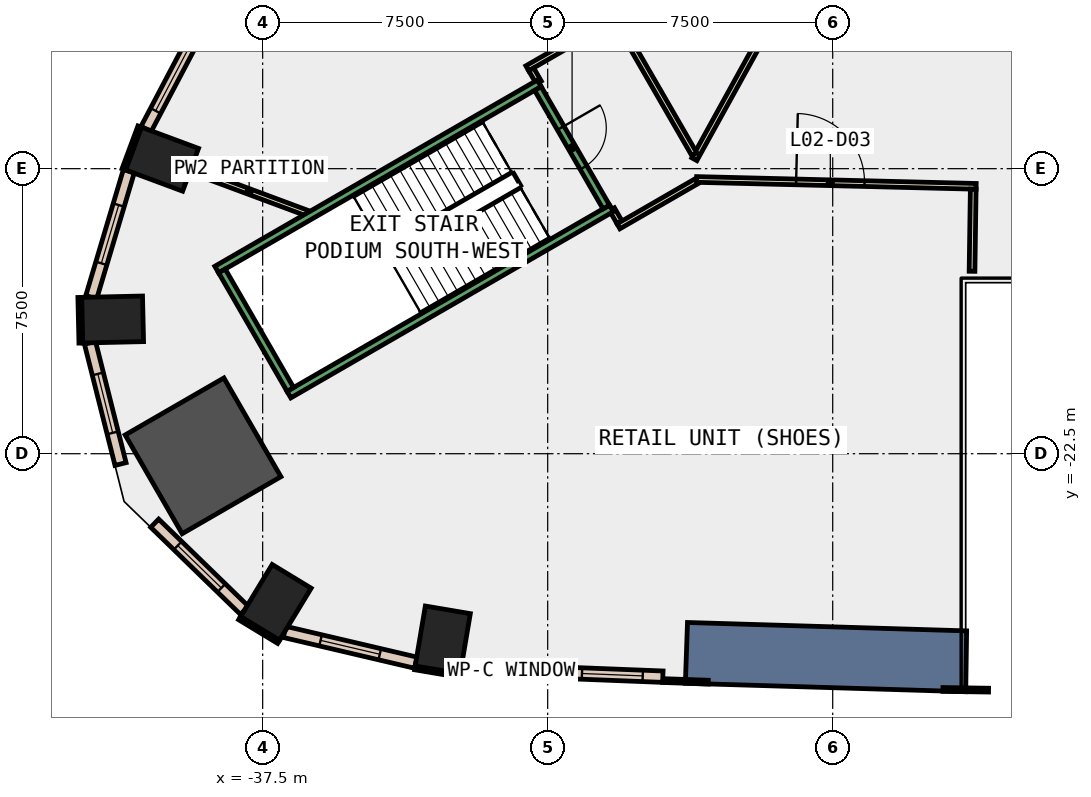
"""IFC4 building model, lengths in metres.
Left out: names, types, materials, properties, quantities, classifications, styles, units other than length and angle.
Written with IfcOpenShell. Run it as: python <this file> out.ifc"""

import sys

from ifc_helpers import new_model, si_unit, direction, frame, frame_2d, origin, origin_2d, place, context, subcontext, project, spatial, polyline, rectangle, outline, extrude, element, fill, save


model = new_model("IFC4")
c1 = context("Model", 3, precision=1e-05, world=origin(), true_north=direction((0.0, 1.0)))
c2 = subcontext(c1, "Body", "Model", "MODEL_VIEW")
j1 = project(units=[si_unit("LENGTHUNIT", "METRE"), si_unit("PLANEANGLEUNIT", "RADIAN")], contexts=[c1])
p1 = place(None, origin())
s1 = spatial("IfcSite", under=j1, at=p1, CompositionType="ELEMENT")
p2 = place(p1, origin())
s2 = spatial("IfcBuilding", under=s1, at=p2, CompositionType="ELEMENT")
p3 = place(p2, frame((0.0, 0.0, 15.0)))
s3 = spatial("IfcBuildingStorey", under=s2, at=p3, CompositionType="ELEMENT", Elevation=15.0)
for number, where, z_axis, x_axis in (
    (1, (-32.761, -27.397, -0.45), (0.0, 0.0, 1.0), (-0.986, 0.167, 0.0)),
    (2, (-40.147, -14.751, -0.45), (0.0, 0.0, 1.0), (0.348, 0.937, 0.0)),
    (3, (-41.448, -18.969, -0.45), (0.0, 0.0, 1.0), (-0.023, 1.0, 0.0)),
):
    element("IfcColumn", number, at=place(p3, frame(where, z_axis=z_axis, x_axis=x_axis)), inside=s3, PredefinedType="COLUMN", context=c2, shape_type="SweptSolid", body=[
        extrude(rectangle(XDim=1.2, YDim=1.6, at=origin_2d()), origin(), (0.0, 0.0, 1.0), 5.0),
    ])
p4 = place(p3, frame((-39.069, -22.556, -0.45), z_axis=(0.0, 0.0, 1.0), x_axis=(0.866025403784, 0.5, 0.0)))
e4 = element("IfcColumn", 4, at=p4, inside=s3, PredefinedType="COLUMN", context=c2, shape_type="SweptSolid", body=[
    extrude(rectangle(XDim=3.0, YDim=3.0, at=origin_2d()), origin(), (0.0, 0.0, 1.0), 5.0),
])
p5 = place(p3, frame((-37.152, -26.411, -0.45), z_axis=(0.0, 0.0, 1.0), x_axis=(-0.854522294989, 0.519414716163, 0.0)))
e5 = element("IfcColumn", 5, at=p5, inside=s3, PredefinedType="COLUMN", context=c2, shape_type="SweptSolid", body=[
    extrude(rectangle(XDim=1.2, YDim=1.6, at=origin_2d()), origin(), (0.0, 0.0, 1.0), 5.0),
])
p6 = place(p3, frame((0.0, 0.0, -0.45)))
e6 = element("IfcWall", 6, at=p6, inside=s3, PredefinedType="SHEAR", context=c2, shape_type="SweptSolid", body=[
    extrude(outline(polyline([(-26.377, -28.54), (-19.0, -28.762), (-18.976, -27.162), (-26.321, -26.941), (-26.377, -28.54)])), origin(), (0.0, 0.0, 1.0), 5.0),
])
p7 = place(p3, frame((-40.735, -13.893, 0.0), z_axis=(0.0, 0.0, 1.0), x_axis=(-0.348268249601, -0.937394914814, 0.0)))
e7 = element("IfcWall", 7, at=p7, inside=s3, PredefinedType="STANDARD", context=c2, shape_type="SweptSolid", body=[
    extrude(rectangle(XDim=1.2, YDim=0.1, at=frame_2d((0.6, 0.0))), origin(), (0.0, 0.0, 1.0), 4.55),
])
p8 = place(p3, frame((-33.494, -28.135, 0.0), z_axis=(0.0, 0.0, 1.0), x_axis=(0.986011774526, -0.166675674579, 0.0)))
e8 = element("IfcWall", 8, at=p8, inside=s3, PredefinedType="STANDARD", context=c2, shape_type="SweptSolid", body=[
    extrude(rectangle(XDim=1.2, YDim=0.1, at=frame_2d((0.6, 0.0))), origin(), (0.0, 0.0, 1.0), 4.55),
])
p9 = place(p3, frame((-26.975, -28.469, 0.0), z_axis=(0.0, 0.0, 1.0), x_axis=(0.999387493042, -0.034994838926, 0.0)))
e9 = element("IfcWall", 9, at=p9, inside=s3, PredefinedType="STANDARD", context=c2, shape_type="SweptSolid", body=[
    extrude(rectangle(XDim=1.2, YDim=0.1, at=frame_2d((0.6, 0.0))), origin(), (0.0, 0.0, 1.0), 4.55),
])
p10 = place(p3, frame((-19.599, -28.703, 0.0), z_axis=(0.0, 0.0, 1.0), x_axis=(0.999886724523, -0.015051183404, 0.0)))
e10 = element("IfcWall", 10, at=p10, inside=s3, PredefinedType="STANDARD", context=c2, shape_type="SweptSolid", body=[
    extrude(rectangle(XDim=1.2, YDim=0.1, at=frame_2d((0.6, 0.0))), origin(), (0.0, 0.0, 1.0), 4.55),
])
for number, where, z_axis, x_axis in (
    (11, (-42.312, -18.388, 0.0), (0.0, 0.0, 1.0), (0.023, -1.0, 0.0)),
    (12, (-38.106, -26.826, 0.0), (0.0, 0.0, 1.0), (0.855, -0.519, 0.0)),
):
    element("IfcWall", number, at=place(p3, frame(where, z_axis=z_axis, x_axis=x_axis)), inside=s3, PredefinedType="STANDARD", context=c2, shape_type="SweptSolid", body=[
        extrude(rectangle(XDim=1.2, YDim=0.1, at=frame_2d((0.6, 0.0))), origin(), (0.0, 0.0, 1.0), 4.55),
    ])
p11 = place(p3, frame((-32.282, -28.159, 0.0), z_axis=(0.0, 0.0, 1.0), x_axis=(0.999234205654, -0.039128023863, 0.0)))
e13 = element("IfcWall", 13, at=p11, inside=s3, PredefinedType="STANDARD", context=c2, shape_type="SweptSolid", body=[
    extrude(rectangle(XDim=5.316, YDim=0.3, at=frame_2d((2.658, 0.0))), origin(), (0.0, 0.0, 1.0), 4.55),
])
p12 = place(p11, frame((0.529, 0.0, 1.0)))
e14 = element("IfcOpeningElement", 14, at=p12, cuts=e13, PredefinedType="OPENING", context=c2, shape_type="SweptSolid", body=[
    extrude(rectangle(XDim=1.6, YDim=3.2, at=frame_2d((0.8, 1.6))), frame((0.0, 0.16, 0.0), z_axis=(0.0, -1.0, 0.0), x_axis=(1.0, 0.0, 0.0)), (0.0, 0.0, 1.0), 0.32),
])
p13 = place(p11, frame((3.187, 0.0, 1.0)))
e15 = element("IfcOpeningElement", 15, at=p13, cuts=e13, PredefinedType="OPENING", context=c2, shape_type="SweptSolid", body=[
    extrude(rectangle(XDim=1.6, YDim=3.2, at=frame_2d((0.8, 1.6))), frame((0.0, 0.16, 0.0), z_axis=(0.0, -1.0, 0.0), x_axis=(1.0, 0.0, 0.0)), (0.0, 0.0, 1.0), 0.32),
])
p14 = place(p3, frame((-37.695, -8.503, 0.0), z_axis=(0.0, 0.0, 1.0), x_axis=(-0.466125129602, -0.884718804792, 0.0)))
e16 = element("IfcWall", 16, at=p14, inside=s3, PredefinedType="STANDARD", context=c2, shape_type="SweptSolid", body=[
    extrude(rectangle(XDim=6.164, YDim=0.3, at=frame_2d((3.082, 0.0))), origin(), (0.0, 0.0, 1.0), 4.55),
])
p15 = place(p14, frame((0.541, 0.0, 1.0)))
e17 = element("IfcOpeningElement", 17, at=p15, cuts=e16, PredefinedType="OPENING", context=c2, shape_type="SweptSolid", body=[
    extrude(rectangle(XDim=2.0, YDim=3.2, at=frame_2d((1.0, 1.6))), frame((0.0, 0.16, 0.0), z_axis=(0.0, -1.0, 0.0), x_axis=(1.0, 0.0, 0.0)), (0.0, 0.0, 1.0), 0.32),
])
p16 = place(p14, frame((3.623, 0.0, 1.0)))
e18 = element("IfcOpeningElement", 18, at=p16, cuts=e16, PredefinedType="OPENING", context=c2, shape_type="SweptSolid", body=[
    extrude(rectangle(XDim=2.0, YDim=3.2, at=frame_2d((1.0, 1.6))), frame((0.0, 0.16, 0.0), z_axis=(0.0, -1.0, 0.0), x_axis=(1.0, 0.0, 0.0)), (0.0, 0.0, 1.0), 0.32),
])
p17 = place(p3, frame((-41.022, -15.066, 0.0), z_axis=(0.0, 0.0, 1.0), x_axis=(-0.285800575124, -0.958289116738, 0.0)))
e19 = element("IfcWall", 19, at=p17, inside=s3, PredefinedType="STANDARD", context=c2, shape_type="SweptSolid", body=[
    extrude(rectangle(XDim=3.46, YDim=0.3, at=frame_2d((1.73, 0.0))), origin(), (0.0, 0.0, 1.0), 4.55),
])
p18 = place(p17, frame((0.93, 0.0, 1.0)))
e20 = element("IfcOpeningElement", 20, at=p18, cuts=e19, PredefinedType="OPENING", context=c2, shape_type="SweptSolid", body=[
    extrude(rectangle(XDim=1.6, YDim=3.2, at=frame_2d((0.8, 1.6))), frame((0.0, 0.16, 0.0), z_axis=(0.0, -1.0, 0.0), x_axis=(1.0, 0.0, 0.0)), (0.0, 0.0, 1.0), 0.32),
])
p19 = place(p3, frame((-42.044, -19.581, 0.0), z_axis=(0.0, 0.0, 1.0), x_axis=(0.244315836028, -0.969695711172, 0.0)))
e21 = element("IfcWall", 21, at=p19, inside=s3, PredefinedType="STANDARD", context=c2, shape_type="SweptSolid", body=[
    extrude(rectangle(XDim=3.291, YDim=0.3, at=frame_2d((1.645, 0.0))), origin(), (0.0, 0.0, 1.0), 4.55),
])
p20 = place(p19, frame((0.845, 0.0, 1.0)))
e22 = element("IfcOpeningElement", 22, at=p20, cuts=e21, PredefinedType="OPENING", context=c2, shape_type="SweptSolid", body=[
    extrude(rectangle(XDim=1.6, YDim=3.2, at=frame_2d((0.8, 1.6))), frame((0.0, 0.16, 0.0), z_axis=(0.0, -1.0, 0.0), x_axis=(1.0, 0.0, 0.0)), (0.0, 0.0, 1.0), 0.32),
])
p21 = place(p3, frame((-40.341, -24.329, 0.0), z_axis=(0.0, 0.0, 1.0), x_axis=(0.717527250225, -0.696530433782, 0.0)))
e23 = element("IfcWall", 23, at=p21, inside=s3, PredefinedType="STANDARD", context=c2, shape_type="SweptSolid", body=[
    extrude(rectangle(XDim=3.291, YDim=0.3, at=frame_2d((1.645, 0.0))), origin(), (0.0, 0.0, 1.0), 4.55),
])
p22 = place(p21, frame((0.845, 0.0, 1.0)))
e24 = element("IfcOpeningElement", 24, at=p22, cuts=e23, PredefinedType="OPENING", context=c2, shape_type="SweptSolid", body=[
    extrude(rectangle(XDim=1.6, YDim=3.2, at=frame_2d((0.8, 1.6))), frame((0.0, 0.16, 0.0), z_axis=(0.0, -1.0, 0.0), x_axis=(1.0, 0.0, 0.0)), (0.0, 0.0, 1.0), 0.32),
])
p23 = place(p3, frame((-36.923, -27.189, 0.0), z_axis=(0.0, 0.0, 1.0), x_axis=(0.97357041301, -0.228387063799, 0.0)))
e25 = element("IfcWall", 25, at=p23, inside=s3, PredefinedType="STANDARD", context=c2, shape_type="SweptSolid", body=[
    extrude(rectangle(XDim=3.547, YDim=0.3, at=frame_2d((1.773, 0.0))), origin(), (0.0, 0.0, 1.0), 4.55),
])
p24 = place(p23, frame((0.973, 0.0, 1.0)))
e26 = element("IfcOpeningElement", 26, at=p24, cuts=e25, PredefinedType="OPENING", context=c2, shape_type="SweptSolid", body=[
    extrude(rectangle(XDim=1.6, YDim=3.2, at=frame_2d((0.8, 1.6))), frame((0.0, 0.16, 0.0), z_axis=(0.0, -1.0, 0.0), x_axis=(1.0, 0.0, 0.0)), (0.0, 0.0, 1.0), 0.32),
])
p25 = place(p3, frame((-39.378, -15.037, 0.0), z_axis=(0.0, 0.0, 1.0), x_axis=(0.937400028274, -0.348254485961, 0.0)))
e27 = element("IfcWall", 27, at=p25, inside=s3, PredefinedType="PARTITIONING", context=c2, shape_type="SweptSolid", body=[
    extrude(rectangle(XDim=3.247, YDim=0.15, at=frame_2d((1.624, 0.0))), origin(), (0.0, 0.0, 1.0), 4.55),
])
p26 = place(p3, frame((-28.309, -16.067, 0.0), z_axis=(0.0, 0.0, 1.0), x_axis=(0.499546646484, -0.86628698939, 0.0)))
e28 = element("IfcWall", 28, at=p26, inside=s3, PredefinedType="PARTITIONING", context=c2, shape_type="SweptSolid", body=[
    extrude(rectangle(XDim=0.401, YDim=0.15, at=frame_2d((0.2, 0.0))), origin(), (0.0, 0.0, 1.0), 4.55),
])
p27 = place(p3, frame((-28.137, -16.517, 0.0), z_axis=(0.0, 0.0, 1.0), x_axis=(0.865960610734, 0.500112208066, 0.0)))
e29 = element("IfcWall", 29, at=p27, inside=s3, PredefinedType="PARTITIONING", context=c2, shape_type="SweptSolid", body=[
    extrude(rectangle(XDim=2.386, YDim=0.15, at=frame_2d((1.193, 0.0))), origin(), (0.0, 0.0, 1.0), 4.55),
])
p28 = place(p3, frame((-26.081, -15.284, 0.0), z_axis=(0.0, 0.0, 1.0), x_axis=(0.999696822244, -0.02462242057, 0.0)))
e30 = element("IfcWall", 30, at=p28, inside=s3, PredefinedType="PARTITIONING", context=c2, shape_type="SweptSolid", body=[
    extrude(rectangle(XDim=7.357, YDim=0.15, at=frame_2d((3.679, 0.0))), origin(), (0.0, 0.0, 1.0), 4.55),
])
p29 = place(p28, frame((2.619, 0.0, 0.0)))
e31 = element("IfcOpeningElement", 31, at=p29, cuts=e30, PredefinedType="OPENING", context=c2, shape_type="SweptSolid", body=[
    extrude(rectangle(XDim=1.8, YDim=2.1, at=frame_2d((0.9, 1.05))), frame((0.0, 0.085, 0.0), z_axis=(0.0, -1.0, 0.0), x_axis=(1.0, 0.0, 0.0)), (0.0, 0.0, 1.0), 0.17),
])
p30 = place(p3, frame((-18.802, -15.538, 0.0), z_axis=(0.0, 0.0, 1.0), x_axis=(-0.014792283123, -0.999890588195, 0.0)))
e32 = element("IfcWall", 32, at=p30, inside=s3, PredefinedType="PARTITIONING", context=c2, shape_type="SweptSolid", body=[
    extrude(rectangle(XDim=2.162, YDim=0.15, at=frame_2d((1.081, 0.0))), origin(), (0.0, 0.0, 1.0), 4.55),
])
p31 = place(p3, frame((-22.654, -8.434, 0.0), z_axis=(0.0, 0.0, 1.0), x_axis=(-0.483089865042, -0.875570775148, 0.0)))
e33 = element("IfcWall", 33, at=p31, inside=s3, PredefinedType="PARTITIONING", context=c2, shape_type="SweptSolid", body=[
    extrude(rectangle(XDim=7.216, YDim=0.15, at=frame_2d((3.608, 0.0))), origin(), (0.0, 0.0, 1.0), 4.55),
])
p32 = place(p3, frame((-26.142, -14.621, 0.0), z_axis=(0.0, 0.0, 1.0), x_axis=(-0.500092051157, 0.865972251501, 0.0)))
e34 = element("IfcWall", 34, at=p32, inside=s3, PredefinedType="PARTITIONING", context=c2, shape_type="SweptSolid", body=[
    extrude(rectangle(XDim=4.231, YDim=0.15, at=frame_2d((2.116, 0.0))), origin(), (0.0, 0.0, 1.0), 4.55),
])
p33 = place(p3, frame((-28.285, -11.059, 0.0), z_axis=(0.0, 0.0, 1.0), x_axis=(-0.866108986466, -0.499855202596, 0.0)))
e35 = element("IfcWall", 35, at=p33, inside=s3, PredefinedType="PARTITIONING", context=c2, shape_type="SweptSolid", body=[
    extrude(rectangle(XDim=2.6, YDim=0.15, at=frame_2d((1.3, 0.0))), origin(), (0.0, 0.0, 1.0), 4.55),
])
p34 = place(p3, frame((-30.434, -12.387, 0.0), z_axis=(0.0, 0.0, 1.0), x_axis=(0.500867716848, -0.865523847285, 0.0)))
e36 = element("IfcWall", 36, at=p34, inside=s3, PredefinedType="PARTITIONING", context=c2, shape_type="SweptSolid", body=[
    extrude(rectangle(XDim=0.4, YDim=0.15, at=frame_2d((0.2, 0.0))), origin(), (0.0, 0.0, 1.0), 4.55),
])
for number, where, z_axis, x_axis in (
    (37, (-30.222, -12.755, 0.0), (0.0, 0.0, 1.0), (-0.866, -0.5, 0.0)),
    (38, (-28.322, -16.045, 0.0), (0.0, 0.0, 1.0), (-0.866, -0.5, 0.0)),
):
    element("IfcWall", number, at=place(p3, frame(where, z_axis=z_axis, x_axis=x_axis)), inside=s3, PredefinedType="STANDARD", context=c2, shape_type="SweptSolid", body=[
        extrude(rectangle(XDim=9.8, YDim=0.2, at=frame_2d((4.9, 0.0))), origin(), (0.0, 0.0, 1.0), 4.55),
    ])
p35 = place(p3, frame((-30.258, -12.891, 0.0), z_axis=(0.0, 0.0, 1.0), x_axis=(0.499982693035, -0.866035395735, 0.0)))
e39 = element("IfcWall", 39, at=p35, inside=s3, PredefinedType="STANDARD", context=c2, shape_type="SweptSolid", body=[
    extrude(rectangle(XDim=3.6, YDim=0.2, at=frame_2d((1.8, 0.0))), origin(), (0.0, 0.0, 1.0), 4.55),
])
p36 = place(p35, frame((1.2, 0.0, 0.0)))
e40 = element("IfcOpeningElement", 40, at=p36, cuts=e39, PredefinedType="OPENING", context=c2, shape_type="SweptSolid", body=[
    extrude(rectangle(XDim=1.2, YDim=2.2, at=frame_2d((0.6, 1.1))), frame((0.0, 0.11, 0.0), z_axis=(0.0, -1.0, 0.0), x_axis=(1.0, 0.0, 0.0)), (0.0, 0.0, 1.0), 0.22),
])
p37 = place(p3, frame((-38.572, -17.691, 0.0), z_axis=(0.0, 0.0, 1.0), x_axis=(0.49995333141, -0.866052346231, 0.0)))
e41 = element("IfcWall", 41, at=p37, inside=s3, PredefinedType="STANDARD", context=c2, shape_type="SweptSolid", body=[
    extrude(rectangle(XDim=3.6, YDim=0.2, at=frame_2d((1.8, 0.0))), origin(), (0.0, 0.0, 1.0), 4.55),
])
p38 = place(p12, origin())
e42 = element("IfcWindow", 42, at=p38, inside=s3, PartitioningType="SINGLE_PANEL", PredefinedType="WINDOW", context=c2, shape_type="SweptSolid", body=[
    extrude(rectangle(XDim=1.6, YDim=3.2, at=frame_2d((0.8, 1.6))), frame((0.0, 0.03, 0.0), z_axis=(0.0, -1.0, 0.0), x_axis=(1.0, 0.0, 0.0)), (0.0, 0.0, 1.0), 0.06),
])
fill(e14, e42)
p39 = place(p13, origin())
e43 = element("IfcWindow", 43, at=p39, inside=s3, PartitioningType="SINGLE_PANEL", PredefinedType="WINDOW", context=c2, shape_type="SweptSolid", body=[
    extrude(rectangle(XDim=1.6, YDim=3.2, at=frame_2d((0.8, 1.6))), frame((0.0, 0.03, 0.0), z_axis=(0.0, -1.0, 0.0), x_axis=(1.0, 0.0, 0.0)), (0.0, 0.0, 1.0), 0.06),
])
fill(e15, e43)
p40 = place(p16, origin())
e44 = element("IfcWindow", 44, at=p40, inside=s3, PartitioningType="SINGLE_PANEL", PredefinedType="WINDOW", context=c2, shape_type="SweptSolid", body=[
    extrude(rectangle(XDim=2.0, YDim=3.2, at=frame_2d((1.0, 1.6))), frame((0.0, 0.03, 0.0), z_axis=(0.0, -1.0, 0.0), x_axis=(1.0, 0.0, 0.0)), (0.0, 0.0, 1.0), 0.06),
])
fill(e18, e44)
p41 = place(p18, origin())
e45 = element("IfcWindow", 45, at=p41, inside=s3, PartitioningType="SINGLE_PANEL", PredefinedType="WINDOW", context=c2, shape_type="SweptSolid", body=[
    extrude(rectangle(XDim=1.6, YDim=3.2, at=frame_2d((0.8, 1.6))), frame((0.0, 0.03, 0.0), z_axis=(0.0, -1.0, 0.0), x_axis=(1.0, 0.0, 0.0)), (0.0, 0.0, 1.0), 0.06),
])
fill(e20, e45)
p42 = place(p20, origin())
e46 = element("IfcWindow", 46, at=p42, inside=s3, PartitioningType="SINGLE_PANEL", PredefinedType="WINDOW", context=c2, shape_type="SweptSolid", body=[
    extrude(rectangle(XDim=1.6, YDim=3.2, at=frame_2d((0.8, 1.6))), frame((0.0, 0.03, 0.0), z_axis=(0.0, -1.0, 0.0), x_axis=(1.0, 0.0, 0.0)), (0.0, 0.0, 1.0), 0.06),
])
fill(e22, e46)
p43 = place(p22, origin())
e47 = element("IfcWindow", 47, at=p43, inside=s3, PartitioningType="SINGLE_PANEL", PredefinedType="WINDOW", context=c2, shape_type="SweptSolid", body=[
    extrude(rectangle(XDim=1.6, YDim=3.2, at=frame_2d((0.8, 1.6))), frame((0.0, 0.03, 0.0), z_axis=(0.0, -1.0, 0.0), x_axis=(1.0, 0.0, 0.0)), (0.0, 0.0, 1.0), 0.06),
])
fill(e24, e47)
p44 = place(p24, origin())
e48 = element("IfcWindow", 48, at=p44, inside=s3, PartitioningType="SINGLE_PANEL", PredefinedType="WINDOW", context=c2, shape_type="SweptSolid", body=[
    extrude(rectangle(XDim=1.6, YDim=3.2, at=frame_2d((0.8, 1.6))), frame((0.0, 0.03, 0.0), z_axis=(0.0, -1.0, 0.0), x_axis=(1.0, 0.0, 0.0)), (0.0, 0.0, 1.0), 0.06),
])
fill(e26, e48)
p45 = place(p29, origin())
e49 = element("IfcDoor", 49, at=p45, inside=s3, OperationType="DOUBLE_DOOR_SINGLE_SWING", PredefinedType="DOOR", context=c2, shape_type="SweptSolid", body=[
    extrude(rectangle(XDim=1.8, YDim=2.1, at=frame_2d((0.9, 1.05))), frame((0.0, 0.025, 0.0), z_axis=(0.0, -1.0, 0.0), x_axis=(1.0, 0.0, 0.0)), (0.0, 0.0, 1.0), 0.05),
])
fill(e31, e49)
p46 = place(p36, origin())
e50 = element("IfcDoor", 50, at=p46, inside=s3, OperationType="SINGLE_SWING_LEFT", PredefinedType="DOOR", context=c2, shape_type="SweptSolid", body=[
    extrude(rectangle(XDim=1.2, YDim=2.2, at=frame_2d((0.6, 1.1))), frame((0.0, 0.025, 0.0), z_axis=(0.0, -1.0, 0.0), x_axis=(1.0, 0.0, 0.0)), (0.0, 0.0, 1.0), 0.05),
])
fill(e40, e50)
save(model, sys.argv[1])
